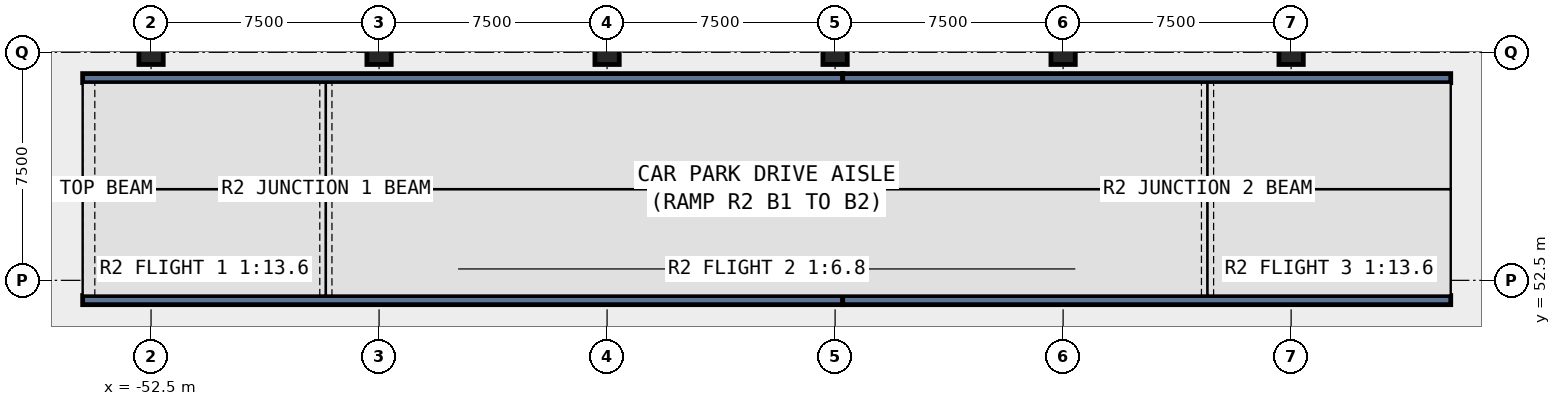
"""IFC4 building model, lengths in metres.
Left out: names, types, materials, properties, quantities, classifications, styles, units other than length and angle.
Written with IfcOpenShell. Run it as: python <this file> out.ifc"""

import sys

from ifc_helpers import new_model, si_unit, direction, frame, frame_2d, origin, origin_2d, place, context, subcontext, project, spatial, rectangle, extrude, element, save


model = new_model("IFC4")
c1 = context("Model", 3, precision=1e-05, world=origin(), true_north=direction((0.0, 1.0)))
c2 = subcontext(c1, "Body", "Model", "MODEL_VIEW")
j1 = project(units=[si_unit("LENGTHUNIT", "METRE"), si_unit("PLANEANGLEUNIT", "RADIAN")], contexts=[c1])
p1 = place(None, origin())
s1 = spatial("IfcSite", under=j1, at=p1, CompositionType="ELEMENT")
p2 = place(p1, origin())
s2 = spatial("IfcBuilding", under=s1, at=p2, CompositionType="ELEMENT")
p3 = place(p2, frame((0.0, 0.0, -11.0)))
s3 = spatial("IfcBuildingStorey", under=s2, at=p3, CompositionType="ELEMENT", Elevation=-11.0)
for number, where, z_axis, x_axis in (
    (1, (-52.5, 60.0, -0.42), (0.0, 0.0, 1.0), (1.0, 0.0, 0.0)),
    (2, (-45.0, 60.0, -0.42), (0.0, 0.0, 1.0), (1.0, 0.0, 0.0)),
    (3, (-37.5, 60.0, -0.42), (0.0, 0.0, 1.0), (1.0, 0.0, 0.0)),
    (4, (-30.0, 60.0, -0.42), (0.0, 0.0, 1.0), (1.0, 0.0, 0.0)),
    (5, (-22.5, 60.0, -0.42), (0.0, 0.0, 1.0), (1.0, 0.0, 0.0)),
    (6, (-15.0, 60.0, -0.42), (0.0, 0.0, 1.0), (1.0, 0.0, 0.0)),
):
    element("IfcColumn", number, at=place(p3, frame(where, z_axis=z_axis, x_axis=x_axis)), inside=s3, PredefinedType="COLUMN", context=c2, shape_type="SweptSolid", body=[
        extrude(rectangle(XDim=0.8, YDim=0.8, at=origin_2d()), origin(), (0.0, 0.0, 1.0), 5.5),
    ])
for number, where, z_axis, x_axis in (
    (7, (-54.75, 51.85, 0.0), (0.0, 0.0, 1.0), (1.0, 0.0, 0.0)),
    (8, (-54.75, 59.15, 0.0), (0.0, 0.0, 1.0), (1.0, 0.0, 0.0)),
):
    element("IfcWall", number, at=place(p3, frame(where, z_axis=z_axis, x_axis=x_axis)), inside=s3, PredefinedType="SOLIDWALL", context=c2, shape_type="SweptSolid", body=[
        extrude(rectangle(XDim=25.0, YDim=0.3, at=frame_2d((12.5, 0.0))), origin(), (0.0, 0.0, 1.0), 5.5),
    ])
for number, where, z_axis, x_axis in (
    (9, (-29.75, 51.85, 0.0), (0.0, 0.0, 1.0), (1.0, 0.0, 0.0)),
    (10, (-29.75, 59.15, 0.0), (0.0, 0.0, 1.0), (1.0, 0.0, 0.0)),
):
    element("IfcWall", number, at=place(p3, frame(where, z_axis=z_axis, x_axis=x_axis)), inside=s3, PredefinedType="SOLIDWALL", context=c2, shape_type="SweptSolid", body=[
        extrude(rectangle(XDim=20.0, YDim=0.3, at=frame_2d((10.0, 0.0))), origin(), (0.0, 0.0, 1.0), 5.08),
    ])
save(model, sys.argv[1])
